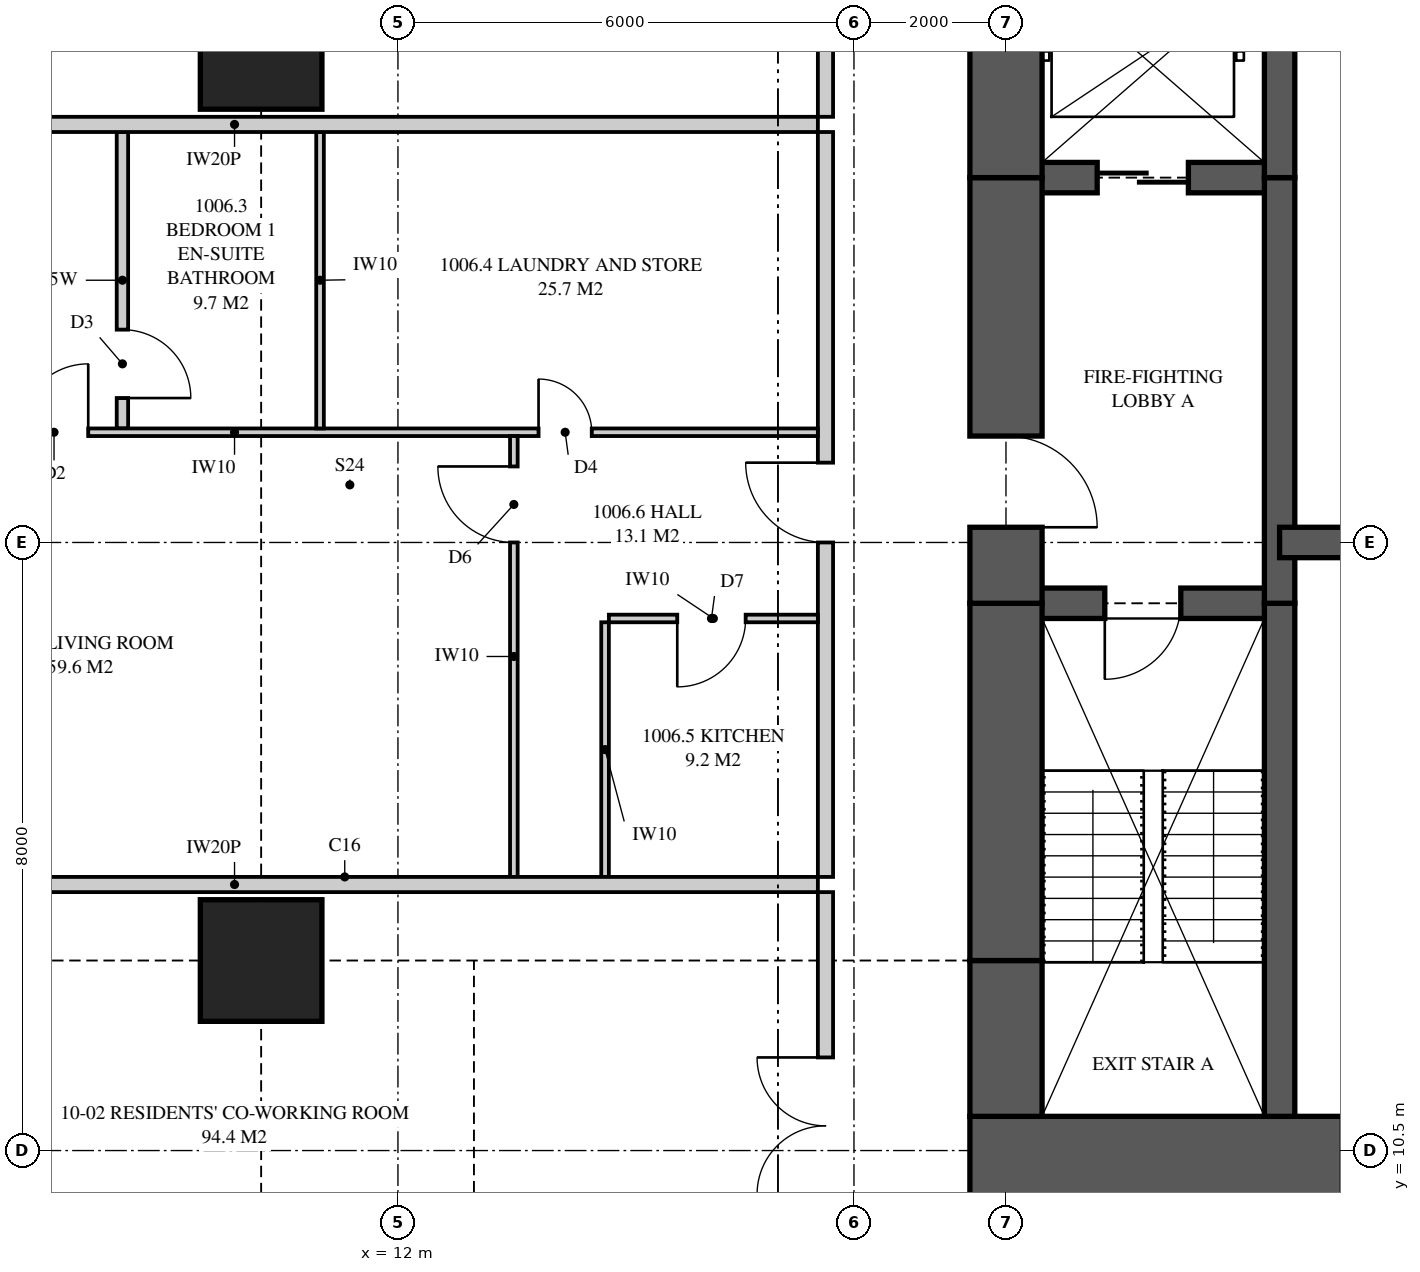
"""IFC4 building model, lengths in metres.
Left out: names, types, materials, properties, quantities, classifications, styles, units other than length and angle.
Written with IfcOpenShell. Run it as: python <this file> out.ifc"""

import sys

from ifc_helpers import new_model, si_unit, direction, frame, frame_2d, origin, origin_2d, place, context, subcontext, project, spatial, polyline, rectangle, outline, extrude, element, fill, save


model = new_model("IFC4")
c1 = context("Model", 3, precision=1e-05, world=origin(), true_north=direction((0.0, 1.0)))
c2 = subcontext(c1, "Body", "Model", "MODEL_VIEW")
j1 = project(units=[si_unit("LENGTHUNIT", "METRE"), si_unit("PLANEANGLEUNIT", "RADIAN")], contexts=[c1])
p1 = place(None, origin())
s1 = spatial("IfcSite", under=j1, at=p1, CompositionType="ELEMENT")
p2 = place(p1, origin())
s2 = spatial("IfcBuilding", under=s1, at=p2, CompositionType="ELEMENT")
p3 = place(p2, frame((0.0, 0.0, 41.1)))
s3 = spatial("IfcBuildingStorey", under=s2, at=p3, CompositionType="ELEMENT", Elevation=41.1)
for number, where, z_axis, x_axis in (
    (1, (10.2, 13.0, 0.0), (0.0, 0.0, 1.0), (1.0, 0.0, 0.0)),
    (2, (10.2, 25.0, 0.0), (0.0, 0.0, 1.0), (1.0, 0.0, 0.0)),
):
    element("IfcColumn", number, at=place(p3, frame(where, z_axis=z_axis, x_axis=x_axis)), inside=s3, PredefinedType="COLUMN", context=c2, shape_type="SweptSolid", body=[
        extrude(rectangle(XDim=1.6, YDim=1.6, at=origin_2d()), origin(), (0.0, 0.0, 1.0), 3.35),
    ])
p4 = place(p3, frame((19.525, 10.125, 0.0), z_axis=(0.0, 0.0, 1.0), x_axis=(1.0, 0.0, 0.0)))
e3 = element("IfcWall", 3, at=p4, inside=s3, PredefinedType="SHEAR", context=c2, shape_type="SweptSolid", body=[
    extrude(rectangle(XDim=6.475, YDim=1.65, at=frame_2d((3.238, 0.0))), origin(), (0.0, 0.0, 1.0), 3.35),
])
p5 = place(p4, frame((4.9, 0.0, 0.0)))
e4 = element("IfcOpeningElement", 4, at=p5, cuts=e3, PredefinedType="OPENING", context=c2, shape_type="SweptSolid", body=[
    extrude(rectangle(XDim=0.75, YDim=2.1, at=frame_2d((0.375, 1.05))), frame((0.0, 0.835, 0.0), z_axis=(0.0, -1.0, 0.0), x_axis=(1.0, 0.0, 0.0)), (0.0, 0.0, 1.0), 1.67),
])
p6 = place(p3, frame((20.0, 26.05, 0.0), z_axis=(0.0, 0.0, 1.0), x_axis=(0.0, -1.0, 0.0)))
e5 = element("IfcWall", 5, at=p6, inside=s3, PredefinedType="SHEAR", context=c2, shape_type="SweptSolid", body=[
    extrude(rectangle(XDim=2.75, YDim=0.95, at=frame_2d((1.375, 0.0))), origin(), (0.0, 0.0, 1.0), 3.35),
])
p7 = place(p3, frame((20.0, 23.3, 0.0), z_axis=(0.0, 0.0, 1.0), x_axis=(0.0, -1.0, 0.0)))
e6 = element("IfcWall", 6, at=p7, inside=s3, PredefinedType="SHEAR", context=c2, shape_type="SweptSolid", body=[
    extrude(rectangle(XDim=5.6, YDim=0.95, at=frame_2d((2.8, 0.0))), origin(), (0.0, 0.0, 1.0), 3.35),
])
p8 = place(p7, frame((3.4, 0.0, 0.0)))
e7 = element("IfcOpeningElement", 7, at=p8, cuts=e6, PredefinedType="OPENING", context=c2, shape_type="SweptSolid", body=[
    extrude(rectangle(XDim=1.2, YDim=2.2, at=frame_2d((0.6, 1.1))), frame((0.0, 0.485, 0.0), z_axis=(0.0, -1.0, 0.0), x_axis=(1.0, 0.0, 0.0)), (0.0, 0.0, 1.0), 0.97),
])
p9 = place(p3, frame((20.0, 17.7, 0.0), z_axis=(0.0, 0.0, 1.0), x_axis=(0.0, -1.0, 0.0)))
e8 = element("IfcWall", 8, at=p9, inside=s3, PredefinedType="SHEAR", context=c2, shape_type="SweptSolid", body=[
    extrude(rectangle(XDim=4.7, YDim=0.95, at=frame_2d((2.35, 0.0))), origin(), (0.0, 0.0, 1.0), 3.35),
])
p10 = place(p3, frame((20.0, 13.0, 0.0), z_axis=(0.0, 0.0, 1.0), x_axis=(0.0, -1.0, 0.0)))
e9 = element("IfcWall", 9, at=p10, inside=s3, PredefinedType="SHEAR", context=c2, shape_type="SweptSolid", body=[
    extrude(rectangle(XDim=2.05, YDim=0.95, at=frame_2d((1.025, 0.0))), origin(), (0.0, 0.0, 1.0), 3.35),
])
p11 = place(p3, frame((23.6, 10.95, 0.0), z_axis=(0.0, 0.0, 1.0), x_axis=(0.0, 1.0, 0.0)))
e10 = element("IfcWall", 10, at=p11, inside=s3, PredefinedType="SHEAR", context=c2, shape_type="SweptSolid", body=[
    extrude(rectangle(XDim=6.75, YDim=0.4, at=frame_2d((3.375, 0.0))), origin(), (0.0, 0.0, 1.0), 3.35),
])
p12 = place(p3, frame((23.6, 17.7, 0.0), z_axis=(0.0, 0.0, 1.0), x_axis=(0.0, 1.0, 0.0)))
e11 = element("IfcWall", 11, at=p12, inside=s3, PredefinedType="SHEAR", context=c2, shape_type="SweptSolid", body=[
    extrude(rectangle(XDim=5.6, YDim=0.4, at=frame_2d((2.8, 0.0))), origin(), (0.0, 0.0, 1.0), 3.35),
])
p13 = place(p3, frame((23.6, 23.3, 0.0), z_axis=(0.0, 0.0, 1.0), x_axis=(0.0, 1.0, 0.0)))
e12 = element("IfcWall", 12, at=p13, inside=s3, PredefinedType="SHEAR", context=c2, shape_type="SweptSolid", body=[
    extrude(rectangle(XDim=2.75, YDim=0.4, at=frame_2d((1.375, 0.0))), origin(), (0.0, 0.0, 1.0), 3.35),
])
p14 = place(p3, frame((20.0, 17.7, 0.0), z_axis=(0.0, 0.0, 1.0), x_axis=(1.0, 0.0, 0.0)))
e13 = element("IfcWall", 13, at=p14, inside=s3, PredefinedType="SHEAR", context=c2, shape_type="SweptSolid", body=[
    extrude(rectangle(XDim=3.6, YDim=0.4, at=frame_2d((1.8, 0.0))), origin(), (0.0, 0.0, 1.0), 3.35),
])
p15 = place(p14, frame((1.3, 0.0, 0.0)))
e14 = element("IfcOpeningElement", 14, at=p15, cuts=e13, PredefinedType="OPENING", context=c2, shape_type="SweptSolid", body=[
    extrude(rectangle(XDim=1.0, YDim=2.1, at=frame_2d((0.5, 1.05))), frame((0.0, 0.21, 0.0), z_axis=(0.0, -1.0, 0.0), x_axis=(1.0, 0.0, 0.0)), (0.0, 0.0, 1.0), 0.42),
])
p16 = place(p3, frame((20.0, 23.3, 0.0), z_axis=(0.0, 0.0, 1.0), x_axis=(1.0, 0.0, 0.0)))
e15 = element("IfcWall", 15, at=p16, inside=s3, PredefinedType="SHEAR", context=c2, shape_type="SweptSolid", body=[
    extrude(rectangle(XDim=3.6, YDim=0.4, at=frame_2d((1.8, 0.0))), origin(), (0.0, 0.0, 1.0), 3.35),
])
p17 = place(p16, frame((1.2, 0.0, 0.0)))
e16 = element("IfcOpeningElement", 16, at=p17, cuts=e15, PredefinedType="OPENING", context=c2, shape_type="SweptSolid", body=[
    extrude(rectangle(XDim=1.2, YDim=2.1, at=frame_2d((0.6, 1.05))), frame((0.0, 0.21, 0.0), z_axis=(0.0, -1.0, 0.0), x_axis=(1.0, 0.0, 0.0)), (0.0, 0.0, 1.0), 0.42),
])
p18 = place(p3, frame((23.6, 18.5, 0.0), z_axis=(0.0, 0.0, 1.0), x_axis=(1.0, 0.0, 0.0)))
e17 = element("IfcWall", 17, at=p18, inside=s3, PredefinedType="SHEAR", context=c2, shape_type="SweptSolid", body=[
    extrude(rectangle(XDim=2.4, YDim=0.4, at=frame_2d((1.2, 0.0))), origin(), (0.0, 0.0, 1.0), 3.35),
])
p19 = place(p3, frame((2.175, 14.0, 0.0), z_axis=(0.0, 0.0, 1.0), x_axis=(1.0, 0.0, 0.0)))
e18 = element("IfcWall", 18, at=p19, inside=s3, PredefinedType="PARTITIONING", context=c2, shape_type="SweptSolid", body=[
    extrude(outline(polyline([(0.529, 2.15), (0.0, 2.15), (0.0, 0.0), (0.529, 0.0), (0.529, 0.815), (1.021, 0.815), (1.021, 0.0), (15.35, 0.0), (15.35, 3.11), (9.335, 3.11), (9.335, 2.51), (6.715, 2.51), (6.715, 3.11), (1.685, 3.11), (1.685, 2.15), (1.021, 2.15), (1.021, 1.335), (0.529, 1.335), (0.529, 2.15)])), frame((0.0, 0.1, 0.0), z_axis=(0.0, -1.0, 0.0), x_axis=(1.0, 0.0, 0.0)), (0.0, 0.0, 1.0), 0.2),
])
p20 = place(p3, frame((17.625, 7.75, 0.0), z_axis=(0.0, 0.0, 1.0), x_axis=(0.0, 1.0, 0.0)))
e19 = element("IfcWall", 19, at=p20, inside=s3, PredefinedType="PARTITIONING", context=c2, shape_type="SweptSolid", body=[
    extrude(outline(polyline([(0.0, 0.0), (6.15, 0.0), (6.15, 3.11), (5.587, 3.11), (5.587, 2.541), (4.913, 2.541), (4.913, 3.11), (0.0, 3.11), (0.0, 0.0)])), frame((0.0, 0.1, 0.0), z_axis=(0.0, -1.0, 0.0), x_axis=(1.0, 0.0, 0.0)), (0.0, 0.0, 1.0), 0.2),
])
p21 = place(p20, frame((2.175, 0.0, 0.0)))
e20 = element("IfcOpeningElement", 20, at=p21, cuts=e19, PredefinedType="OPENING", context=c2, shape_type="SweptSolid", body=[
    extrude(rectangle(XDim=1.8, YDim=2.1, at=frame_2d((0.9, 1.05))), frame((0.0, 0.11, 0.0), z_axis=(0.0, -1.0, 0.0), x_axis=(1.0, 0.0, 0.0)), (0.0, 0.0, 1.0), 0.22),
])
p22 = place(p3, frame((2.175, 24.0, 0.0), z_axis=(0.0, 0.0, 1.0), x_axis=(1.0, 0.0, 0.0)))
e21 = element("IfcWall", 21, at=p22, inside=s3, PredefinedType="PARTITIONING", context=c2, shape_type="SweptSolid", body=[
    extrude(outline(polyline([(0.529, 2.15), (0.0, 2.15), (0.0, 0.0), (0.529, 0.0), (0.529, 0.815), (1.021, 0.815), (1.021, 0.0), (15.35, 0.0), (15.35, 3.11), (9.335, 3.11), (9.335, 2.51), (6.715, 2.51), (6.715, 3.11), (1.685, 3.11), (1.685, 2.15), (1.021, 2.15), (1.021, 1.335), (0.529, 1.335), (0.529, 2.15)])), frame((0.0, 0.1, 0.0), z_axis=(0.0, -1.0, 0.0), x_axis=(1.0, 0.0, 0.0)), (0.0, 0.0, 1.0), 0.2),
])
p23 = place(p3, frame((17.625, 14.1, 0.0), z_axis=(0.0, 0.0, 1.0), x_axis=(0.0, 1.0, 0.0)))
e22 = element("IfcWall", 22, at=p23, inside=s3, PredefinedType="PARTITIONING", context=c2, shape_type="SweptSolid", body=[
    extrude(rectangle(XDim=9.8, YDim=0.2, at=frame_2d((4.9, 0.0))), origin(), (0.0, 0.0, 1.0), 3.11),
])
p24 = place(p23, frame((4.4, 0.0, 0.0)))
e23 = element("IfcOpeningElement", 23, at=p24, cuts=e22, PredefinedType="OPENING", context=c2, shape_type="SweptSolid", body=[
    extrude(rectangle(XDim=1.05, YDim=2.2, at=frame_2d((0.525, 1.1))), frame((0.0, 0.11, 0.0), z_axis=(0.0, -1.0, 0.0), x_axis=(1.0, 0.0, 0.0)), (0.0, 0.0, 1.0), 0.22),
])
p25 = place(p3, frame((2.175, 19.95, 0.0), z_axis=(0.0, 0.0, 1.0), x_axis=(1.0, 0.0, 0.0)))
e24 = element("IfcWall", 24, at=p25, inside=s3, PredefinedType="PARTITIONING", context=c2, shape_type="SweptSolid", body=[
    extrude(outline(polyline([(0.0, 0.0), (15.35, 0.0), (15.35, 3.11), (9.285, 3.11), (9.285, 2.51), (6.765, 2.51), (6.765, 3.11), (1.635, 3.11), (1.635, 2.15), (0.0, 2.15), (0.0, 3.11), (0.0, 0.0)])), frame((0.0, 0.05, 0.0), z_axis=(0.0, -1.0, 0.0), x_axis=(1.0, 0.0, 0.0)), (0.0, 0.0, 1.0), 0.1),
])
p26 = place(p25, frame((4.85, 0.0, 0.0)))
e25 = element("IfcOpeningElement", 25, at=p26, cuts=e24, PredefinedType="OPENING", context=c2, shape_type="SweptSolid", body=[
    extrude(rectangle(XDim=0.9, YDim=2.1, at=frame_2d((0.45, 1.05))), frame((0.0, 0.06, 0.0), z_axis=(0.0, -1.0, 0.0), x_axis=(1.0, 0.0, 0.0)), (0.0, 0.0, 1.0), 0.12),
])
p27 = place(p25, frame((11.675, 0.0, 0.0)))
e26 = element("IfcOpeningElement", 26, at=p27, cuts=e24, PredefinedType="OPENING", context=c2, shape_type="SweptSolid", body=[
    extrude(rectangle(XDim=0.7, YDim=2.1, at=frame_2d((0.35, 1.05))), frame((0.0, 0.06, 0.0), z_axis=(0.0, -1.0, 0.0), x_axis=(1.0, 0.0, 0.0)), (0.0, 0.0, 1.0), 0.12),
])
p28 = place(p3, frame((8.375, 20.0, 0.0), z_axis=(0.0, 0.0, 1.0), x_axis=(0.0, 1.0, 0.0)))
e27 = element("IfcWall", 27, at=p28, inside=s3, PredefinedType="PLUMBINGWALL", context=c2, shape_type="SweptSolid", body=[
    extrude(rectangle(XDim=3.9, YDim=0.15, at=frame_2d((1.95, 0.0))), origin(), (0.0, 0.0, 1.0), 3.11),
])
p29 = place(p28, frame((0.4, 0.0, 0.0)))
e28 = element("IfcOpeningElement", 28, at=p29, cuts=e27, PredefinedType="OPENING", context=c2, shape_type="SweptSolid", body=[
    extrude(rectangle(XDim=0.9, YDim=2.1, at=frame_2d((0.45, 1.05))), frame((0.0, 0.085, 0.0), z_axis=(0.0, -1.0, 0.0), x_axis=(1.0, 0.0, 0.0)), (0.0, 0.0, 1.0), 0.17),
])
p30 = place(p3, frame((10.975, 20.0, 0.0), z_axis=(0.0, 0.0, 1.0), x_axis=(0.0, 1.0, 0.0)))
e29 = element("IfcWall", 29, at=p30, inside=s3, PredefinedType="PARTITIONING", context=c2, shape_type="SweptSolid", body=[
    extrude(outline(polyline([(0.0, 0.0), (3.9, 0.0), (3.9, 3.11), (3.9, 2.51), (0.0, 2.51), (0.0, 3.11), (0.0, 0.0)])), frame((0.0, 0.05, 0.0), z_axis=(0.0, -1.0, 0.0), x_axis=(1.0, 0.0, 0.0)), (0.0, 0.0, 1.0), 0.1),
])
p31 = place(p3, frame((13.525, 14.1, 0.0), z_axis=(0.0, 0.0, 1.0), x_axis=(0.0, 1.0, 0.0)))
e30 = element("IfcWall", 30, at=p31, inside=s3, PredefinedType="PARTITIONING", context=c2, shape_type="SweptSolid", body=[
    extrude(rectangle(XDim=5.8, YDim=0.1, at=frame_2d((2.9, 0.0))), origin(), (0.0, 0.0, 1.0), 3.11),
])
p32 = place(p31, frame((4.4, 0.0, 0.0)))
e31 = element("IfcOpeningElement", 31, at=p32, cuts=e30, PredefinedType="OPENING", context=c2, shape_type="SweptSolid", body=[
    extrude(rectangle(XDim=1.0, YDim=2.1, at=frame_2d((0.5, 1.05))), frame((0.0, 0.06, 0.0), z_axis=(0.0, -1.0, 0.0), x_axis=(1.0, 0.0, 0.0)), (0.0, 0.0, 1.0), 0.12),
])
p33 = place(p3, frame((14.725, 14.1, 0.0), z_axis=(0.0, 0.0, 1.0), x_axis=(0.0, 1.0, 0.0)))
e32 = element("IfcWall", 32, at=p33, inside=s3, PredefinedType="PARTITIONING", context=c2, shape_type="SweptSolid", body=[
    extrude(rectangle(XDim=3.35, YDim=0.1, at=frame_2d((1.675, 0.0))), origin(), (0.0, 0.0, 1.0), 3.11),
])
p34 = place(p3, frame((14.775, 17.5, 0.0), z_axis=(0.0, 0.0, 1.0), x_axis=(1.0, 0.0, 0.0)))
e33 = element("IfcWall", 33, at=p34, inside=s3, PredefinedType="PARTITIONING", context=c2, shape_type="SweptSolid", body=[
    extrude(rectangle(XDim=2.75, YDim=0.1, at=frame_2d((1.375, 0.0))), origin(), (0.0, 0.0, 1.0), 3.11),
])
p35 = place(p34, frame((0.9, 0.0, 0.0)))
e34 = element("IfcOpeningElement", 34, at=p35, cuts=e33, PredefinedType="OPENING", context=c2, shape_type="SweptSolid", body=[
    extrude(rectangle(XDim=0.9, YDim=2.1, at=frame_2d((0.45, 1.05))), frame((0.0, 0.06, 0.0), z_axis=(0.0, -1.0, 0.0), x_axis=(1.0, 0.0, 0.0)), (0.0, 0.0, 1.0), 0.12),
])
p36 = place(p3, frame((17.625, 24.1, 0.0), z_axis=(0.0, 0.0, 1.0), x_axis=(0.0, 1.0, 0.0)))
e35 = element("IfcWall", 35, at=p36, inside=s3, PredefinedType="PARTITIONING", context=c2, shape_type="SweptSolid", body=[
    extrude(outline(polyline([(0.0, 0.0), (5.15, 0.0), (5.15, 3.11), (1.237, 3.11), (1.237, 2.541), (0.562, 2.541), (0.562, 3.11), (0.0, 3.11), (0.0, 0.0)])), frame((0.0, 0.1, 0.0), z_axis=(0.0, -1.0, 0.0), x_axis=(1.0, 0.0, 0.0)), (0.0, 0.0, 1.0), 0.2),
])
p37 = place(p36, frame((1.675, 0.0, 0.0)))
e36 = element("IfcOpeningElement", 36, at=p37, cuts=e35, PredefinedType="OPENING", context=c2, shape_type="SweptSolid", body=[
    extrude(rectangle(XDim=1.8, YDim=2.1, at=frame_2d((0.9, 1.05))), frame((0.0, 0.11, 0.0), z_axis=(0.0, -1.0, 0.0), x_axis=(1.0, 0.0, 0.0)), (0.0, 0.0, 1.0), 0.22),
])
p38 = place(p21, origin())
e37 = element("IfcDoor", 37, at=p38, inside=s3, OperationType="DOUBLE_DOOR_SINGLE_SWING", PredefinedType="DOOR", context=c2, shape_type="SweptSolid", body=[
    extrude(rectangle(XDim=1.8, YDim=2.1, at=frame_2d((0.9, 1.05))), frame((0.0, 0.025, 0.0), z_axis=(0.0, -1.0, 0.0), x_axis=(1.0, 0.0, 0.0)), (0.0, 0.0, 1.0), 0.05),
])
fill(e20, e37)
p39 = place(p24, origin())
e38 = element("IfcDoor", 38, at=p39, inside=s3, OperationType="SINGLE_SWING_RIGHT", PredefinedType="DOOR", context=c2, shape_type="SweptSolid", body=[
    extrude(rectangle(XDim=1.05, YDim=2.2, at=frame_2d((0.525, 1.1))), frame((0.0, 0.025, 0.0), z_axis=(0.0, -1.0, 0.0), x_axis=(1.0, 0.0, 0.0)), (0.0, 0.0, 1.0), 0.05),
])
fill(e23, e38)
p40 = place(p26, origin())
e39 = element("IfcDoor", 39, at=p40, inside=s3, OperationType="SINGLE_SWING_RIGHT", PredefinedType="DOOR", context=c2, shape_type="SweptSolid", body=[
    extrude(rectangle(XDim=0.9, YDim=2.1, at=frame_2d((0.45, 1.05))), frame((0.0, 0.025, 0.0), z_axis=(0.0, -1.0, 0.0), x_axis=(1.0, 0.0, 0.0)), (0.0, 0.0, 1.0), 0.05),
])
fill(e25, e39)
p41 = place(p29, frame((0.9, 0.0, 0.0), z_axis=(0.0, 0.0, 1.0), x_axis=(-1.0, 0.0, 0.0)))
e40 = element("IfcDoor", 40, at=p41, inside=s3, OperationType="SINGLE_SWING_RIGHT", PredefinedType="DOOR", context=c2, shape_type="SweptSolid", body=[
    extrude(rectangle(XDim=0.9, YDim=2.1, at=frame_2d((0.45, 1.05))), frame((0.0, 0.025, 0.0), z_axis=(0.0, -1.0, 0.0), x_axis=(1.0, 0.0, 0.0)), (0.0, 0.0, 1.0), 0.05),
])
fill(e28, e40)
p42 = place(p27, origin())
e41 = element("IfcDoor", 41, at=p42, inside=s3, OperationType="SINGLE_SWING_LEFT", PredefinedType="DOOR", context=c2, shape_type="SweptSolid", body=[
    extrude(rectangle(XDim=0.7, YDim=2.1, at=frame_2d((0.35, 1.05))), frame((0.0, 0.025, 0.0), z_axis=(0.0, -1.0, 0.0), x_axis=(1.0, 0.0, 0.0)), (0.0, 0.0, 1.0), 0.05),
])
fill(e26, e41)
p43 = place(p35, frame((0.9, 0.0, 0.0), z_axis=(0.0, 0.0, 1.0), x_axis=(-1.0, 0.0, 0.0)))
e42 = element("IfcDoor", 42, at=p43, inside=s3, OperationType="SINGLE_SWING_RIGHT", PredefinedType="DOOR", context=c2, shape_type="SweptSolid", body=[
    extrude(rectangle(XDim=0.9, YDim=2.1, at=frame_2d((0.45, 1.05))), frame((0.0, 0.025, 0.0), z_axis=(0.0, -1.0, 0.0), x_axis=(1.0, 0.0, 0.0)), (0.0, 0.0, 1.0), 0.05),
])
fill(e34, e42)
p44 = place(p32, origin())
e43 = element("IfcDoor", 43, at=p44, inside=s3, OperationType="SINGLE_SWING_RIGHT", PredefinedType="DOOR", context=c2, shape_type="SweptSolid", body=[
    extrude(rectangle(XDim=1.0, YDim=2.1, at=frame_2d((0.5, 1.05))), frame((0.0, 0.025, 0.0), z_axis=(0.0, -1.0, 0.0), x_axis=(1.0, 0.0, 0.0)), (0.0, 0.0, 1.0), 0.05),
])
fill(e31, e43)
p45 = place(p15, frame((1.0, 0.0, 0.0), z_axis=(0.0, 0.0, 1.0), x_axis=(-1.0, 0.0, 0.0)))
e44 = element("IfcDoor", 44, at=p45, inside=s3, OperationType="SINGLE_SWING_RIGHT", PredefinedType="DOOR", context=c2, shape_type="SweptSolid", body=[
    extrude(rectangle(XDim=1.0, YDim=2.1, at=frame_2d((0.5, 1.05))), frame((0.0, 0.025, 0.0), z_axis=(0.0, -1.0, 0.0), x_axis=(1.0, 0.0, 0.0)), (0.0, 0.0, 1.0), 0.05),
])
fill(e14, e44)
p46 = place(p8, origin())
e45 = element("IfcDoor", 45, at=p46, inside=s3, OperationType="SINGLE_SWING_RIGHT", PredefinedType="DOOR", context=c2, shape_type="SweptSolid", body=[
    extrude(rectangle(XDim=1.2, YDim=2.2, at=frame_2d((0.6, 1.1))), frame((0.0, 0.025, 0.0), z_axis=(0.0, -1.0, 0.0), x_axis=(1.0, 0.0, 0.0)), (0.0, 0.0, 1.0), 0.05),
])
fill(e7, e45)
p47 = place(p17, origin())
e46 = element("IfcDoor", 46, at=p47, inside=s3, OperationType="SLIDING_TO_LEFT", PredefinedType="DOOR", context=c2, shape_type="SweptSolid", body=[
    extrude(rectangle(XDim=1.2, YDim=2.1, at=frame_2d((0.6, 1.05))), frame((0.0, 0.025, 0.0), z_axis=(0.0, -1.0, 0.0), x_axis=(1.0, 0.0, 0.0)), (0.0, 0.0, 1.0), 0.05),
])
fill(e16, e46)
save(model, sys.argv[1])
